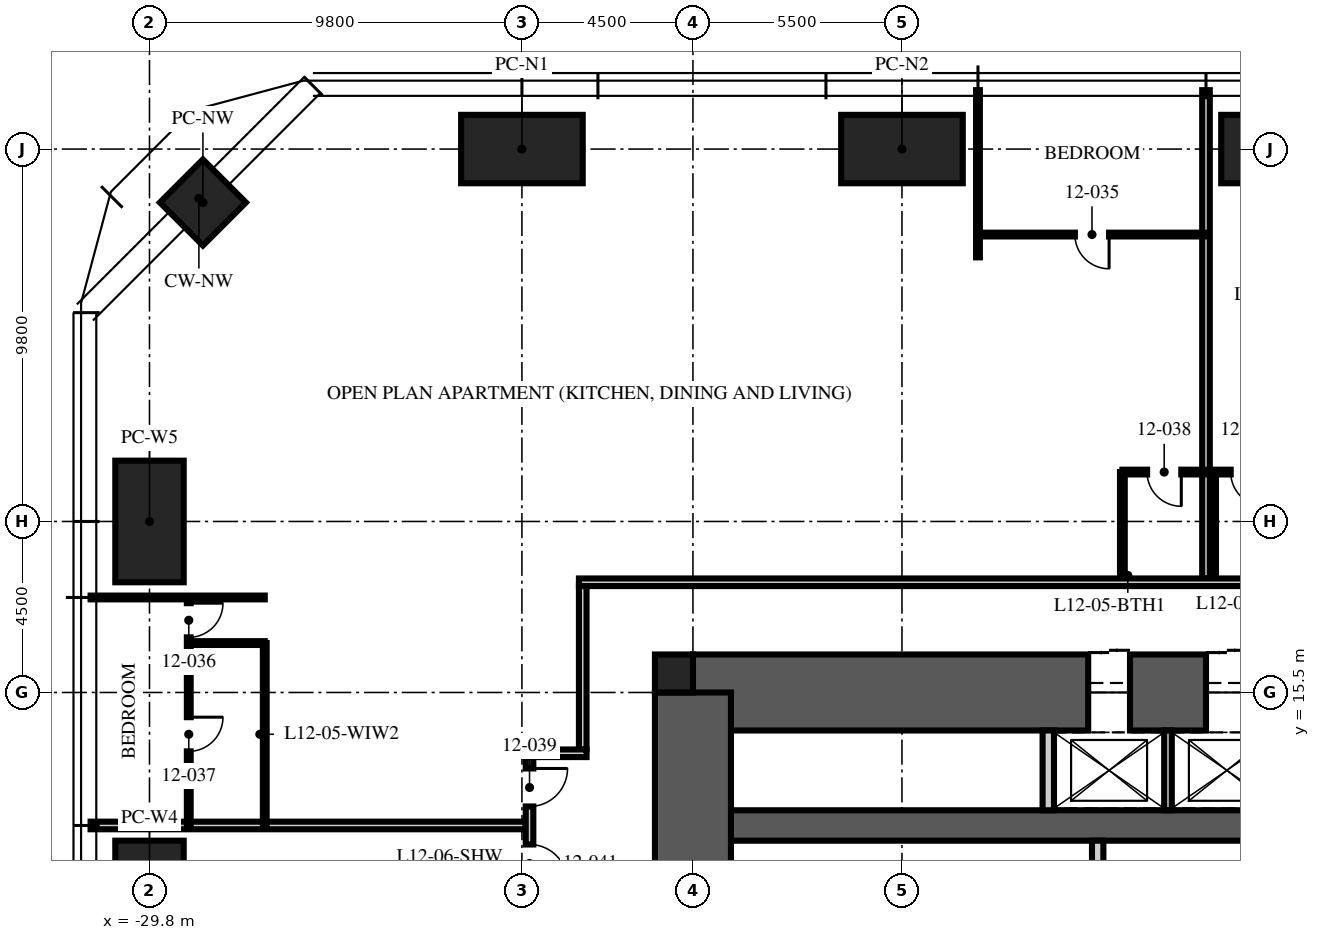
"""IFC4 building model, lengths in metres.
Left out: names, types, materials, properties, quantities, classifications, styles, units other than length and angle.
Written with IfcOpenShell. Run it as: python <this file> out.ifc"""

import sys

from ifc_helpers import new_model, si_unit, direction, frame, frame_2d, origin, origin_2d, place, context, subcontext, project, spatial, rectangle, hollow_rectangle, extrude, element, fill, save


model = new_model("IFC4")
c1 = context("Model", 3, precision=1e-05, world=origin(), true_north=direction((0.0, 1.0)))
c2 = subcontext(c1, "Body", "Model", "MODEL_VIEW")
j1 = project(units=[si_unit("LENGTHUNIT", "METRE"), si_unit("PLANEANGLEUNIT", "RADIAN")], contexts=[c1])
p1 = place(None, origin())
s1 = spatial("IfcSite", under=j1, at=p1, CompositionType="ELEMENT")
p2 = place(p1, origin())
s2 = spatial("IfcBuilding", under=s1, at=p2, CompositionType="ELEMENT")
p3 = place(p2, frame((0.0, 0.0, 51.0)))
s3 = spatial("IfcBuildingStorey", under=s2, at=p3, CompositionType="ELEMENT", Elevation=51.0)
p4 = place(p3, frame((-15.5, 15.5, -0.25), z_axis=(0.0, 0.0, 1.0), x_axis=(1.0, 0.0, 0.0)))
e1 = element("IfcWall", 1, at=p4, inside=s3, PredefinedType="SHEAR", context=c2, shape_type="SweptSolid", body=[
    extrude(rectangle(XDim=31.0, YDim=2.0, at=frame_2d((15.5, 0.0))), origin(), (0.0, 0.0, 1.0), 3.75),
])
p5 = place(p4, frame((10.4, 0.0, 0.25)))
e2 = element("IfcOpeningElement", 2, at=p5, cuts=e1, PredefinedType="OPENING", context=c2, shape_type="SweptSolid", body=[
    extrude(rectangle(XDim=1.1, YDim=2.1, at=frame_2d((0.55, 1.05))), frame((0.0, 1.01, 0.0), z_axis=(0.0, -1.0, 0.0), x_axis=(1.0, 0.0, 0.0)), (0.0, 0.0, 1.0), 2.02),
])
p6 = place(p4, frame((13.5, 0.0, 0.25)))
e3 = element("IfcOpeningElement", 3, at=p6, cuts=e1, PredefinedType="OPENING", context=c2, shape_type="SweptSolid", body=[
    extrude(rectangle(XDim=1.1, YDim=2.1, at=frame_2d((0.55, 1.05))), frame((0.0, 1.01, 0.0), z_axis=(0.0, -1.0, 0.0), x_axis=(1.0, 0.0, 0.0)), (0.0, 0.0, 1.0), 2.02),
])
p7 = place(p4, frame((16.6, 0.0, 0.25)))
e4 = element("IfcOpeningElement", 4, at=p7, cuts=e1, PredefinedType="OPENING", context=c2, shape_type="SweptSolid", body=[
    extrude(rectangle(XDim=1.1, YDim=2.1, at=frame_2d((0.55, 1.05))), frame((0.0, 1.01, 0.0), z_axis=(0.0, -1.0, 0.0), x_axis=(1.0, 0.0, 0.0)), (0.0, 0.0, 1.0), 2.02),
])
p8 = place(p3, frame((-15.5, 12.0, -0.25), z_axis=(0.0, 0.0, 1.0), x_axis=(1.0, 0.0, 0.0)))
e5 = element("IfcWall", 5, at=p8, inside=s3, PredefinedType="SHEAR", context=c2, shape_type="SweptSolid", body=[
    extrude(rectangle(XDim=31.0, YDim=0.8, at=frame_2d((15.5, 0.0))), origin(), (0.0, 0.0, 1.0), 3.75),
])
p9 = place(p3, frame((-15.5, -15.5, -0.25), z_axis=(0.0, 0.0, 1.0), x_axis=(0.0, 1.0, 0.0)))
e6 = element("IfcWall", 6, at=p9, inside=s3, PredefinedType="SHEAR", context=c2, shape_type="SweptSolid", body=[
    extrude(rectangle(XDim=31.0, YDim=2.0, at=frame_2d((15.5, 0.0))), origin(), (0.0, 0.0, 1.0), 3.75),
])
p10 = place(p9, frame((6.5, 0.0, 0.25)))
e7 = element("IfcOpeningElement", 7, at=p10, cuts=e6, PredefinedType="OPENING", context=c2, shape_type="SweptSolid", body=[
    extrude(rectangle(XDim=1.2, YDim=2.1, at=frame_2d((0.6, 1.05))), frame((0.0, 1.01, 0.0), z_axis=(0.0, -1.0, 0.0), x_axis=(1.0, 0.0, 0.0)), (0.0, 0.0, 1.0), 2.02),
])
p11 = place(p9, frame((23.0, 0.0, 0.25)))
e8 = element("IfcOpeningElement", 8, at=p11, cuts=e6, PredefinedType="OPENING", context=c2, shape_type="SweptSolid", body=[
    extrude(rectangle(XDim=1.8, YDim=2.1, at=frame_2d((0.9, 1.05))), frame((0.0, 1.01, 0.0), z_axis=(0.0, -1.0, 0.0), x_axis=(1.0, 0.0, 0.0)), (0.0, 0.0, 1.0), 2.02),
])
p12 = place(p3, frame((-16.0, 16.0, -0.25), z_axis=(0.0, 0.0, 1.0), x_axis=(1.0, 0.0, 0.0)))
e9 = element("IfcColumn", 9, at=p12, inside=s3, PredefinedType="COLUMN", context=c2, shape_type="SweptSolid", body=[
    extrude(rectangle(XDim=1.0, YDim=1.0, at=origin_2d()), origin(), (0.0, 0.0, 1.0), 3.75),
])
for number, where, z_axis, x_axis in (
    (10, (-20.0, 29.8, 0.0), (0.0, 0.0, 1.0), (1.0, 0.0, 0.0)),
    (11, (-10.0, 29.8, 0.0), (0.0, 0.0, 1.0), (1.0, 0.0, 0.0)),
    (12, (0.0, 29.8, 0.0), (0.0, 0.0, 1.0), (1.0, 0.0, 0.0)),
    (13, (-29.8, 10.0, 0.0), (0.0, 0.0, 1.0), (0.0, 1.0, 0.0)),
    (14, (-29.8, 20.0, 0.0), (0.0, 0.0, 1.0), (0.0, 1.0, 0.0)),
):
    element("IfcColumn", number, at=place(p3, frame(where, z_axis=z_axis, x_axis=x_axis)), inside=s3, PredefinedType="COLUMN", context=c2, shape_type="SweptSolid", body=[
        extrude(hollow_rectangle(XDim=3.2, YDim=1.8, WallThickness=0.2, at=origin_2d()), origin(), (0.0, 0.0, 1.0), 3.75),
    ])
p13 = place(p3, frame((-28.394, 28.394, 0.0), z_axis=(0.0, 0.0, 1.0), x_axis=(0.707106781187, 0.707106781187, 0.0)))
e15 = element("IfcColumn", 15, at=p13, inside=s3, PredefinedType="COLUMN", context=c2, shape_type="SweptSolid", body=[
    extrude(hollow_rectangle(XDim=1.6, YDim=1.6, WallThickness=0.1, at=origin_2d()), origin(), (0.0, 0.0, 1.0), 3.75),
])
p14 = place(p3, frame((-6.15, 12.4, 0.0), z_axis=(0.0, 0.0, 1.0), x_axis=(0.0, 1.0, 0.0)))
e16 = element("IfcWall", 16, at=p14, inside=s3, PredefinedType="PARTITIONING", context=c2, shape_type="SweptSolid", body=[
    extrude(rectangle(XDim=2.1, YDim=0.3, at=frame_2d((1.05, 0.0))), origin(), (0.0, 0.0, 1.0), 3.5),
])
p15 = place(p3, frame((-3.0, 12.4, 0.0), z_axis=(0.0, 0.0, 1.0), x_axis=(0.0, 1.0, 0.0)))
e17 = element("IfcWall", 17, at=p15, inside=s3, PredefinedType="PARTITIONING", context=c2, shape_type="SweptSolid", body=[
    extrude(rectangle(XDim=2.1, YDim=0.2, at=frame_2d((1.05, 0.0))), origin(), (0.0, 0.0, 1.0), 3.5),
])
p16 = place(p3, frame((-4.85, 5.3, 0.0), z_axis=(0.0, 0.0, 1.0), x_axis=(0.0, 1.0, 0.0)))
e18 = element("IfcWall", 18, at=p16, inside=s3, PredefinedType="PARTITIONING", context=c2, shape_type="SweptSolid", body=[
    extrude(rectangle(XDim=6.3, YDim=0.3, at=frame_2d((3.15, 0.0))), origin(), (0.0, 0.0, 1.0), 3.5),
])
p17 = place(p16, frame((4.35, 0.0, 0.0)))
e19 = element("IfcOpeningElement", 19, at=p17, cuts=e18, PredefinedType="OPENING", context=c2, shape_type="SweptSolid", body=[
    extrude(rectangle(XDim=0.9, YDim=2.1, at=frame_2d((0.45, 1.05))), frame((0.0, 0.16, 0.0), z_axis=(0.0, -1.0, 0.0), x_axis=(1.0, 0.0, 0.0)), (0.0, 0.0, 1.0), 0.32),
])
p18 = place(p3, frame((-2.0, 18.5, 0.0), z_axis=(0.0, 0.0, 1.0), x_axis=(0.0, 1.0, 0.0)))
e20 = element("IfcWall", 20, at=p18, inside=s3, PredefinedType="PARTITIONING", context=c2, shape_type="SweptSolid", body=[
    extrude(rectangle(XDim=12.85, YDim=0.2, at=frame_2d((6.425, 0.0))), origin(), (0.0, 0.0, 1.0), 2.71),
])
p19 = place(p3, frame((-8.0, 26.95, 0.0), z_axis=(0.0, 0.0, 1.0), x_axis=(0.0, 1.0, 0.0)))
e21 = element("IfcWall", 21, at=p19, inside=s3, PredefinedType="PARTITIONING", context=c2, shape_type="SweptSolid", body=[
    extrude(rectangle(XDim=4.4, YDim=0.1, at=frame_2d((2.2, 0.0))), origin(), (0.0, 0.0, 1.0), 2.71),
])
p20 = place(p3, frame((-26.767, 18.0, 0.0), z_axis=(0.0, 0.0, 1.0), x_axis=(-1.0, 0.0, 0.0)))
e22 = element("IfcWall", 22, at=p20, inside=s3, PredefinedType="PARTITIONING", context=c2, shape_type="SweptSolid", body=[
    extrude(rectangle(XDim=4.583, YDim=0.1, at=frame_2d((2.292, 0.0))), origin(), (0.0, 0.0, 1.0), 2.71),
])
p21 = place(p3, frame((-19.9, 12.0, 0.0), z_axis=(0.0, 0.0, 1.0), x_axis=(-1.0, 0.0, 0.0)))
e23 = element("IfcWall", 23, at=p21, inside=s3, PredefinedType="PARTITIONING", context=c2, shape_type="SweptSolid", body=[
    extrude(rectangle(XDim=11.45, YDim=0.2, at=frame_2d((5.725, 0.0))), origin(), (0.0, 0.0, 1.0), 2.71),
])
p22 = place(p3, frame((0.0, 21.3, 0.0), z_axis=(0.0, 0.0, 1.0), x_axis=(-1.0, 0.0, 0.0)))
e24 = element("IfcWall", 24, at=p22, inside=s3, PredefinedType="PARTITIONING", context=c2, shape_type="SweptSolid", body=[
    extrude(rectangle(XDim=1.8, YDim=0.125, at=frame_2d((0.9, 0.0))), origin(), (0.0, 0.0, 1.0), 2.492),
])
p23 = place(p22, frame((0.45, 0.0, 0.0)))
e25 = element("IfcOpeningElement", 25, at=p23, cuts=e24, PredefinedType="OPENING", context=c2, shape_type="SweptSolid", body=[
    extrude(rectangle(XDim=0.9, YDim=2.1, at=frame_2d((0.45, 1.05))), frame((0.0, 0.073, 0.0), z_axis=(0.0, -1.0, 0.0), x_axis=(1.0, 0.0, 0.0)), (0.0, 0.0, 1.0), 0.145),
])
p24 = place(p3, frame((-1.8, 18.5, 0.0), z_axis=(0.0, 0.0, 1.0), x_axis=(0.0, 1.0, 0.0)))
e26 = element("IfcWall", 26, at=p24, inside=s3, PredefinedType="PARTITIONING", context=c2, shape_type="SweptSolid", body=[
    extrude(rectangle(XDim=2.8, YDim=0.125, at=frame_2d((1.4, 0.0))), origin(), (0.0, 0.0, 1.0), 3.5),
])
p25 = place(p3, frame((-2.0, 27.55, 0.0), z_axis=(0.0, 0.0, 1.0), x_axis=(-1.0, 0.0, 0.0)))
e27 = element("IfcWall", 27, at=p25, inside=s3, PredefinedType="PARTITIONING", context=c2, shape_type="SweptSolid", body=[
    extrude(rectangle(XDim=6.0, YDim=0.1, at=frame_2d((3.0, 0.0))), origin(), (0.0, 0.0, 1.0), 2.61),
])
p26 = place(p25, frame((2.55, 0.0, 0.0)))
e28 = element("IfcOpeningElement", 28, at=p26, cuts=e27, PredefinedType="OPENING", context=c2, shape_type="SweptSolid", body=[
    extrude(rectangle(XDim=0.9, YDim=2.1, at=frame_2d((0.45, 1.05))), frame((0.0, 0.06, 0.0), z_axis=(0.0, -1.0, 0.0), x_axis=(1.0, 0.0, 0.0)), (0.0, 0.0, 1.0), 0.12),
])
p27 = place(p3, frame((-28.767, 18.0, 0.0), z_axis=(0.0, 0.0, 1.0), x_axis=(0.0, -1.0, 0.0)))
e29 = element("IfcWall", 29, at=p27, inside=s3, PredefinedType="PARTITIONING", context=c2, shape_type="SweptSolid", body=[
    extrude(rectangle(XDim=6.0, YDim=0.1, at=frame_2d((3.0, 0.0))), origin(), (0.0, 0.0, 1.0), 2.61),
])
p28 = place(p27, frame((0.15, 0.0, 0.0)))
e30 = element("IfcOpeningElement", 30, at=p28, cuts=e29, PredefinedType="OPENING", context=c2, shape_type="SweptSolid", body=[
    extrude(rectangle(XDim=0.9, YDim=2.1, at=frame_2d((0.45, 1.05))), frame((0.0, 0.06, 0.0), z_axis=(0.0, -1.0, 0.0), x_axis=(1.0, 0.0, 0.0)), (0.0, 0.0, 1.0), 0.12),
])
p29 = place(p27, frame((3.15, 0.0, 0.0)))
e31 = element("IfcOpeningElement", 31, at=p29, cuts=e29, PredefinedType="OPENING", context=c2, shape_type="SweptSolid", body=[
    extrude(rectangle(XDim=0.9, YDim=2.1, at=frame_2d((0.45, 1.05))), frame((0.0, 0.06, 0.0), z_axis=(0.0, -1.0, 0.0), x_axis=(1.0, 0.0, 0.0)), (0.0, 0.0, 1.0), 0.12),
])
p30 = place(p3, frame((-26.767, 16.8, 0.0), z_axis=(0.0, 0.0, 1.0), x_axis=(-1.0, 0.0, 0.0)))
e32 = element("IfcWall", 32, at=p30, inside=s3, PredefinedType="PARTITIONING", context=c2, shape_type="SweptSolid", body=[
    extrude(rectangle(XDim=2.0, YDim=0.1, at=frame_2d((1.0, 0.0))), origin(), (0.0, 0.0, 1.0), 3.5),
])
p31 = place(p3, frame((-26.767, 16.8, 0.0), z_axis=(0.0, 0.0, 1.0), x_axis=(0.0, -1.0, 0.0)))
e33 = element("IfcWall", 33, at=p31, inside=s3, PredefinedType="PARTITIONING", context=c2, shape_type="SweptSolid", body=[
    extrude(rectangle(XDim=4.8, YDim=0.1, at=frame_2d((2.4, 0.0))), origin(), (0.0, 0.0, 1.0), 2.61),
])
p32 = place(p3, frame((-2.0, 21.3, 0.0), z_axis=(0.0, 0.0, 1.0), x_axis=(-1.0, 0.0, 0.0)))
e34 = element("IfcWall", 34, at=p32, inside=s3, PredefinedType="PARTITIONING", context=c2, shape_type="SweptSolid", body=[
    extrude(rectangle(XDim=2.2, YDim=0.125, at=frame_2d((1.1, 0.0))), origin(), (0.0, 0.0, 1.0), 3.5),
])
p33 = place(p32, frame((0.65, 0.0, 0.0)))
e35 = element("IfcOpeningElement", 35, at=p33, cuts=e34, PredefinedType="OPENING", context=c2, shape_type="SweptSolid", body=[
    extrude(rectangle(XDim=0.9, YDim=2.1, at=frame_2d((0.45, 1.05))), frame((0.0, 0.073, 0.0), z_axis=(0.0, -1.0, 0.0), x_axis=(1.0, 0.0, 0.0)), (0.0, 0.0, 1.0), 0.145),
])
p34 = place(p3, frame((-4.2, 18.5, 0.0), z_axis=(0.0, 0.0, 1.0), x_axis=(0.0, 1.0, 0.0)))
e36 = element("IfcWall", 36, at=p34, inside=s3, PredefinedType="PARTITIONING", context=c2, shape_type="SweptSolid", body=[
    extrude(rectangle(XDim=2.8, YDim=0.125, at=frame_2d((1.4, 0.0))), origin(), (0.0, 0.0, 1.0), 3.5),
])
p35 = place(p3, frame((-18.5, 18.4, 0.0), z_axis=(0.0, 0.0, 1.0), x_axis=(1.0, 0.0, 0.0)))
e37 = element("IfcWall", 37, at=p35, inside=s3, PredefinedType="PARTITIONING", context=c2, shape_type="SweptSolid", body=[
    extrude(rectangle(XDim=18.5, YDim=0.2, at=frame_2d((9.25, 0.0))), origin(), (0.0, 0.0, 1.0), 2.3),
])
p36 = place(p3, frame((-18.4, 18.3, 0.0), z_axis=(0.0, 0.0, 1.0), x_axis=(0.0, -1.0, 0.0)))
e38 = element("IfcWall", 38, at=p36, inside=s3, PredefinedType="PARTITIONING", context=c2, shape_type="SweptSolid", body=[
    extrude(rectangle(XDim=4.3, YDim=0.2, at=frame_2d((2.15, 0.0))), origin(), (0.0, 0.0, 1.0), 2.3),
])
p37 = place(p3, frame((-18.3, 13.9, 0.0), z_axis=(0.0, 0.0, 1.0), x_axis=(-1.0, 0.0, 0.0)))
e39 = element("IfcWall", 39, at=p37, inside=s3, PredefinedType="PARTITIONING", context=c2, shape_type="SweptSolid", body=[
    extrude(rectangle(XDim=1.6, YDim=0.2, at=frame_2d((0.8, 0.0))), origin(), (0.0, 0.0, 1.0), 3.5),
])
p38 = place(p3, frame((-19.8, 13.8, 0.0), z_axis=(0.0, 0.0, 1.0), x_axis=(0.0, -1.0, 0.0)))
e40 = element("IfcWall", 40, at=p38, inside=s3, PredefinedType="PARTITIONING", context=c2, shape_type="SweptSolid", body=[
    extrude(rectangle(XDim=3.6, YDim=0.2, at=frame_2d((1.8, 0.0))), origin(), (0.0, 0.0, 1.0), 3.5),
])
p39 = place(p38, frame((0.3, 0.0, 0.0)))
e41 = element("IfcOpeningElement", 41, at=p39, cuts=e40, PredefinedType="OPENING", context=c2, shape_type="SweptSolid", body=[
    extrude(rectangle(XDim=1.0, YDim=2.2, at=frame_2d((0.5, 1.1))), frame((0.0, 0.11, 0.0), z_axis=(0.0, -1.0, 0.0), x_axis=(1.0, 0.0, 0.0)), (0.0, 0.0, 1.0), 0.22),
])
p40 = place(p38, frame((2.3, 0.0, 0.0)))
e42 = element("IfcOpeningElement", 42, at=p40, cuts=e40, PredefinedType="OPENING", context=c2, shape_type="SweptSolid", body=[
    extrude(rectangle(XDim=1.0, YDim=2.2, at=frame_2d((0.5, 1.1))), frame((0.0, 0.11, 0.0), z_axis=(0.0, -1.0, 0.0), x_axis=(1.0, 0.0, 0.0)), (0.0, 0.0, 1.0), 0.22),
])
p41 = place(p5, origin())
e43 = element("IfcDoor", 43, at=p41, inside=s3, OperationType="DOUBLE_DOOR_SLIDING", PredefinedType="DOOR", context=c2, shape_type="SweptSolid", body=[
    extrude(rectangle(XDim=1.1, YDim=2.1, at=frame_2d((0.55, 1.05))), frame((0.0, 0.025, 0.0), z_axis=(0.0, -1.0, 0.0), x_axis=(1.0, 0.0, 0.0)), (0.0, 0.0, 1.0), 0.05),
])
fill(e2, e43)
p42 = place(p6, origin())
e44 = element("IfcDoor", 44, at=p42, inside=s3, OperationType="DOUBLE_DOOR_SLIDING", PredefinedType="DOOR", context=c2, shape_type="SweptSolid", body=[
    extrude(rectangle(XDim=1.1, YDim=2.1, at=frame_2d((0.55, 1.05))), frame((0.0, 0.025, 0.0), z_axis=(0.0, -1.0, 0.0), x_axis=(1.0, 0.0, 0.0)), (0.0, 0.0, 1.0), 0.05),
])
fill(e3, e44)
p43 = place(p23, origin())
e45 = element("IfcDoor", 45, at=p43, inside=s3, OperationType="SINGLE_SWING_LEFT", PredefinedType="DOOR", context=c2, shape_type="SweptSolid", body=[
    extrude(rectangle(XDim=0.9, YDim=2.1, at=frame_2d((0.45, 1.05))), frame((0.0, 0.025, 0.0), z_axis=(0.0, -1.0, 0.0), x_axis=(1.0, 0.0, 0.0)), (0.0, 0.0, 1.0), 0.05),
])
fill(e25, e45)
p44 = place(p26, origin())
e46 = element("IfcDoor", 46, at=p44, inside=s3, OperationType="SINGLE_SWING_LEFT", PredefinedType="DOOR", context=c2, shape_type="SweptSolid", body=[
    extrude(rectangle(XDim=0.9, YDim=2.1, at=frame_2d((0.45, 1.05))), frame((0.0, 0.025, 0.0), z_axis=(0.0, -1.0, 0.0), x_axis=(1.0, 0.0, 0.0)), (0.0, 0.0, 1.0), 0.05),
])
fill(e28, e46)
p45 = place(p28, origin())
e47 = element("IfcDoor", 47, at=p45, inside=s3, OperationType="SINGLE_SWING_LEFT", PredefinedType="DOOR", context=c2, shape_type="SweptSolid", body=[
    extrude(rectangle(XDim=0.9, YDim=2.1, at=frame_2d((0.45, 1.05))), frame((0.0, 0.025, 0.0), z_axis=(0.0, -1.0, 0.0), x_axis=(1.0, 0.0, 0.0)), (0.0, 0.0, 1.0), 0.05),
])
fill(e30, e47)
p46 = place(p29, origin())
e48 = element("IfcDoor", 48, at=p46, inside=s3, OperationType="SINGLE_SWING_LEFT", PredefinedType="DOOR", context=c2, shape_type="SweptSolid", body=[
    extrude(rectangle(XDim=0.9, YDim=2.1, at=frame_2d((0.45, 1.05))), frame((0.0, 0.025, 0.0), z_axis=(0.0, -1.0, 0.0), x_axis=(1.0, 0.0, 0.0)), (0.0, 0.0, 1.0), 0.05),
])
fill(e31, e48)
p47 = place(p33, origin())
e49 = element("IfcDoor", 49, at=p47, inside=s3, OperationType="SINGLE_SWING_LEFT", PredefinedType="DOOR", context=c2, shape_type="SweptSolid", body=[
    extrude(rectangle(XDim=0.9, YDim=2.1, at=frame_2d((0.45, 1.05))), frame((0.0, 0.025, 0.0), z_axis=(0.0, -1.0, 0.0), x_axis=(1.0, 0.0, 0.0)), (0.0, 0.0, 1.0), 0.05),
])
fill(e35, e49)
p48 = place(p39, origin())
e50 = element("IfcDoor", 50, at=p48, inside=s3, OperationType="SINGLE_SWING_LEFT", PredefinedType="DOOR", context=c2, shape_type="SweptSolid", body=[
    extrude(rectangle(XDim=1.0, YDim=2.2, at=frame_2d((0.5, 1.1))), frame((0.0, 0.025, 0.0), z_axis=(0.0, -1.0, 0.0), x_axis=(1.0, 0.0, 0.0)), (0.0, 0.0, 1.0), 0.05),
])
fill(e41, e50)
p49 = place(p40, origin())
e51 = element("IfcDoor", 51, at=p49, inside=s3, OperationType="SINGLE_SWING_RIGHT", PredefinedType="DOOR", context=c2, shape_type="SweptSolid", body=[
    extrude(rectangle(XDim=1.0, YDim=2.2, at=frame_2d((0.5, 1.1))), frame((0.0, 0.025, 0.0), z_axis=(0.0, -1.0, 0.0), x_axis=(1.0, 0.0, 0.0)), (0.0, 0.0, 1.0), 0.05),
])
fill(e42, e51)
save(model, sys.argv[1])
